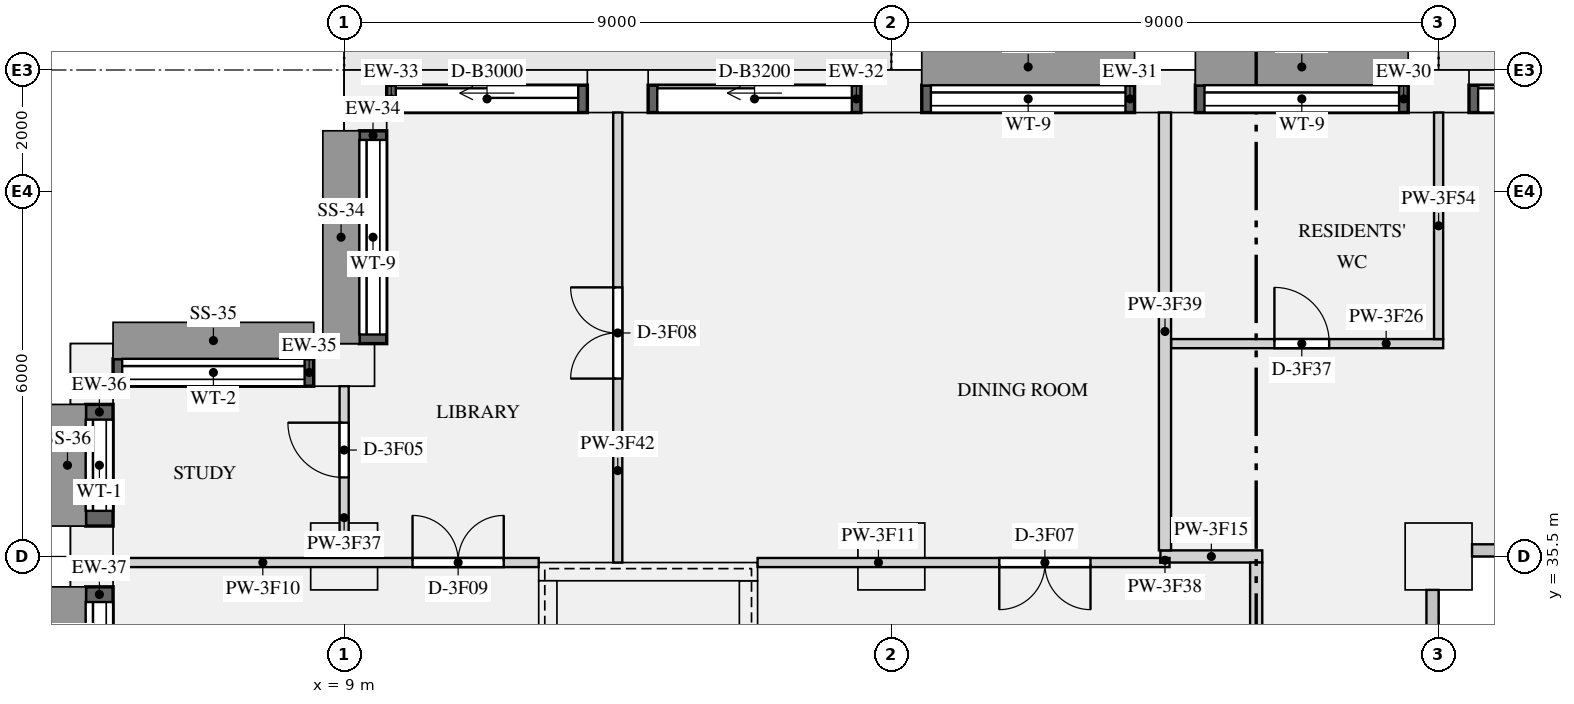
"""IFC4 building model, lengths in metres.
Left out: names, types, materials, properties, quantities, classifications, styles, units other than length and angle.
Written with IfcOpenShell. Run it as: python <this file> out.ifc"""

import sys

from ifc_helpers import new_model, si_unit, direction, frame, frame_2d, origin, origin_2d, place, context, subcontext, project, spatial, rectangle, extrude, element, fill, save


model = new_model("IFC4")
c1 = context("Model", 3, precision=1e-05, world=origin(), true_north=direction((0.0, 1.0)))
c2 = subcontext(c1, "Body", "Model", "MODEL_VIEW")
j1 = project(units=[si_unit("LENGTHUNIT", "METRE"), si_unit("PLANEANGLEUNIT", "RADIAN")], contexts=[c1])
p1 = place(None, origin())
s1 = spatial("IfcSite", under=j1, at=p1, CompositionType="ELEMENT")
p2 = place(p1, origin())
s2 = spatial("IfcBuilding", under=s1, at=p2, CompositionType="ELEMENT")
p3 = place(p2, frame((0.0, 0.0, 179.1)))
s3 = spatial("IfcBuildingStorey", under=s2, at=p3, CompositionType="ELEMENT", Elevation=179.1)
for number, where, z_axis, x_axis in (
    (1, (27.0, 43.15, 0.0), (0.0, 0.0, 1.0), (-1.0, 0.0, 0.0)),
    (2, (22.5, 43.15, 0.0), (0.0, 0.0, 1.0), (-1.0, 0.0, 0.0)),
    (3, (18.0, 43.15, 0.0), (0.0, 0.0, 1.0), (-1.0, 0.0, 0.0)),
    (4, (13.5, 43.15, 0.0), (0.0, 0.0, 1.0), (-1.0, 0.0, 0.0)),
    (5, (9.35, 43.0, 0.0), (0.0, 0.0, 1.0), (0.0, -1.0, 0.0)),
    (6, (9.0, 38.65, 0.0), (0.0, 0.0, 1.0), (-1.0, 0.0, 0.0)),
    (7, (4.85, 38.5, 0.0), (0.0, 0.0, 1.0), (0.0, -1.0, 0.0)),
    (8, (4.85, 35.5, 0.0), (0.0, 0.0, 1.0), (0.0, -1.0, 0.0)),
):
    element("IfcColumn", number, at=place(p3, frame(where, z_axis=z_axis, x_axis=x_axis)), inside=s3, PredefinedType="USERDEFINED", context=c2, shape_type="SweptSolid", body=[
        extrude(rectangle(XDim=1.0, YDim=0.7, at=origin_2d()), origin(), (0.0, 0.0, 1.0), 3.15),
    ])
for number, where, z_axis, x_axis in (
    (9, (9.0, 35.5, 0.0), (0.0, 0.0, 1.0), (1.0, 0.0, 0.0)),
    (10, (18.0, 35.5, 0.0), (0.0, 0.0, 1.0), (1.0, 0.0, 0.0)),
    (11, (27.0, 35.5, 0.0), (0.0, 0.0, 1.0), (1.0, 0.0, 0.0)),
):
    element("IfcColumn", number, at=place(p3, frame(where, z_axis=z_axis, x_axis=x_axis)), inside=s3, PredefinedType="COLUMN", context=c2, shape_type="SweptSolid", body=[
        extrude(rectangle(XDim=1.1, YDim=1.1, at=origin_2d()), origin(), (0.0, 0.0, 1.0), 3.15),
    ])
p4 = place(p3, frame((12.2, 35.25, 0.0), z_axis=(0.0, 0.0, 1.0), x_axis=(1.0, 0.0, 0.0)))
e12 = element("IfcWall", 12, at=p4, inside=s3, PredefinedType="SHEAR", context=c2, shape_type="SweptSolid", body=[
    extrude(rectangle(XDim=3.6, YDim=0.3, at=frame_2d((1.8, 0.0))), origin(), (0.0, 0.0, 1.0), 3.15),
])
for number, where, z_axis, x_axis in (
    (13, (12.35, 27.3, 0.0), (0.0, 0.0, 1.0), (0.0, 1.0, 0.0)),
    (14, (15.65, 27.3, 0.0), (0.0, 0.0, 1.0), (0.0, 1.0, 0.0)),
):
    element("IfcWall", number, at=place(p3, frame(where, z_axis=z_axis, x_axis=x_axis)), inside=s3, PredefinedType="SHEAR", context=c2, shape_type="SweptSolid", body=[
        extrude(rectangle(XDim=7.8, YDim=0.3, at=frame_2d((3.9, 0.0))), origin(), (0.0, 0.0, 1.0), 3.15),
    ])
p5 = place(p3, frame((31.0, 43.025, 0.0), z_axis=(0.0, 0.0, 1.0), x_axis=(-1.0, 0.0, 0.0)))
e15 = element("IfcWall", 15, at=p5, inside=s3, PredefinedType="SOLIDWALL", context=c2, shape_type="SweptSolid", body=[
    extrude(rectangle(XDim=3.5, YDim=0.45, at=frame_2d((1.75, 0.0))), origin(), (0.0, 0.0, 1.0), 2.83),
])
p6 = place(p5, frame((0.15, 0.0, 0.0)))
e16 = element("IfcOpeningElement", 16, at=p6, cuts=e15, PredefinedType="OPENING", context=c2, shape_type="SweptSolid", body=[
    extrude(rectangle(XDim=3.2, YDim=2.3, at=frame_2d((1.6, 1.15))), frame((0.0, 0.235, 0.0), z_axis=(0.0, -1.0, 0.0), x_axis=(1.0, 0.0, 0.0)), (0.0, 0.0, 1.0), 0.47),
])
p7 = place(p3, frame((26.5, 43.025, 0.9), z_axis=(0.0, 0.0, 1.0), x_axis=(-1.0, 0.0, 0.0)))
e17 = element("IfcWall", 17, at=p7, inside=s3, PredefinedType="SOLIDWALL", context=c2, shape_type="SweptSolid", body=[
    extrude(rectangle(XDim=3.5, YDim=0.45, at=frame_2d((1.75, 0.0))), origin(), (0.0, 0.0, 1.0), 1.93),
])
p8 = place(p7, frame((0.15, 0.0, 0.15)))
e18 = element("IfcOpeningElement", 18, at=p8, cuts=e17, PredefinedType="OPENING", context=c2, shape_type="SweptSolid", body=[
    extrude(rectangle(XDim=3.2, YDim=1.5, at=frame_2d((1.6, 0.75))), frame((0.0, 0.235, 0.0), z_axis=(0.0, -1.0, 0.0), x_axis=(1.0, 0.0, 0.0)), (0.0, 0.0, 1.0), 0.47),
])
p9 = place(p3, frame((22.0, 43.025, 0.9), z_axis=(0.0, 0.0, 1.0), x_axis=(-1.0, 0.0, 0.0)))
e19 = element("IfcWall", 19, at=p9, inside=s3, PredefinedType="SOLIDWALL", context=c2, shape_type="SweptSolid", body=[
    extrude(rectangle(XDim=3.5, YDim=0.45, at=frame_2d((1.75, 0.0))), origin(), (0.0, 0.0, 1.0), 1.93),
])
p10 = place(p9, frame((0.15, 0.0, 0.15)))
e20 = element("IfcOpeningElement", 20, at=p10, cuts=e19, PredefinedType="OPENING", context=c2, shape_type="SweptSolid", body=[
    extrude(rectangle(XDim=3.2, YDim=1.5, at=frame_2d((1.6, 0.75))), frame((0.0, 0.235, 0.0), z_axis=(0.0, -1.0, 0.0), x_axis=(1.0, 0.0, 0.0)), (0.0, 0.0, 1.0), 0.47),
])
p11 = place(p3, frame((17.5, 43.025, 0.0), z_axis=(0.0, 0.0, 1.0), x_axis=(-1.0, 0.0, 0.0)))
e21 = element("IfcWall", 21, at=p11, inside=s3, PredefinedType="SOLIDWALL", context=c2, shape_type="SweptSolid", body=[
    extrude(rectangle(XDim=3.5, YDim=0.45, at=frame_2d((1.75, 0.0))), origin(), (0.0, 0.0, 1.0), 2.83),
])
p12 = place(p11, frame((0.15, 0.0, 0.0)))
e22 = element("IfcOpeningElement", 22, at=p12, cuts=e21, PredefinedType="OPENING", context=c2, shape_type="SweptSolid", body=[
    extrude(rectangle(XDim=3.2, YDim=2.3, at=frame_2d((1.6, 1.15))), frame((0.0, 0.235, 0.0), z_axis=(0.0, -1.0, 0.0), x_axis=(1.0, 0.0, 0.0)), (0.0, 0.0, 1.0), 0.47),
])
p13 = place(p3, frame((13.0, 43.025, 0.0), z_axis=(0.0, 0.0, 1.0), x_axis=(-1.0, 0.0, 0.0)))
e23 = element("IfcWall", 23, at=p13, inside=s3, PredefinedType="SOLIDWALL", context=c2, shape_type="SweptSolid", body=[
    extrude(rectangle(XDim=3.3, YDim=0.45, at=frame_2d((1.65, 0.0))), origin(), (0.0, 0.0, 1.0), 2.83),
])
p14 = place(p13, frame((0.15, 0.0, 0.0)))
e24 = element("IfcOpeningElement", 24, at=p14, cuts=e23, PredefinedType="OPENING", context=c2, shape_type="SweptSolid", body=[
    extrude(rectangle(XDim=3.0, YDim=2.3, at=frame_2d((1.5, 1.15))), frame((0.0, 0.235, 0.0), z_axis=(0.0, -1.0, 0.0), x_axis=(1.0, 0.0, 0.0)), (0.0, 0.0, 1.0), 0.47),
])
p15 = place(p3, frame((9.475, 42.5, 0.9), z_axis=(0.0, 0.0, 1.0), x_axis=(0.0, -1.0, 0.0)))
e25 = element("IfcWall", 25, at=p15, inside=s3, PredefinedType="SOLIDWALL", context=c2, shape_type="SweptSolid", body=[
    extrude(rectangle(XDim=3.5, YDim=0.45, at=frame_2d((1.75, 0.0))), origin(), (0.0, 0.0, 1.0), 1.93),
])
p16 = place(p15, frame((0.15, 0.0, 0.15)))
e26 = element("IfcOpeningElement", 26, at=p16, cuts=e25, PredefinedType="OPENING", context=c2, shape_type="SweptSolid", body=[
    extrude(rectangle(XDim=3.2, YDim=1.5, at=frame_2d((1.6, 0.75))), frame((0.0, 0.235, 0.0), z_axis=(0.0, -1.0, 0.0), x_axis=(1.0, 0.0, 0.0)), (0.0, 0.0, 1.0), 0.47),
])
p17 = place(p3, frame((8.5, 38.525, 0.9), z_axis=(0.0, 0.0, 1.0), x_axis=(-1.0, 0.0, 0.0)))
e27 = element("IfcWall", 27, at=p17, inside=s3, PredefinedType="SOLIDWALL", context=c2, shape_type="SweptSolid", body=[
    extrude(rectangle(XDim=3.3, YDim=0.45, at=frame_2d((1.65, 0.0))), origin(), (0.0, 0.0, 1.0), 1.93),
])
p18 = place(p17, frame((0.15, 0.0, 0.15)))
e28 = element("IfcOpeningElement", 28, at=p18, cuts=e27, PredefinedType="OPENING", context=c2, shape_type="SweptSolid", body=[
    extrude(rectangle(XDim=3.0, YDim=1.5, at=frame_2d((1.5, 0.75))), frame((0.0, 0.235, 0.0), z_axis=(0.0, -1.0, 0.0), x_axis=(1.0, 0.0, 0.0)), (0.0, 0.0, 1.0), 0.47),
])
p19 = place(p3, frame((4.975, 38.0, 0.9), z_axis=(0.0, 0.0, 1.0), x_axis=(0.0, -1.0, 0.0)))
e29 = element("IfcWall", 29, at=p19, inside=s3, PredefinedType="SOLIDWALL", context=c2, shape_type="SweptSolid", body=[
    extrude(rectangle(XDim=2.0, YDim=0.45, at=frame_2d((1.0, 0.0))), origin(), (0.0, 0.0, 1.0), 1.93),
])
p20 = place(p19, frame((0.25, 0.0, 0.15)))
e30 = element("IfcOpeningElement", 30, at=p20, cuts=e29, PredefinedType="OPENING", context=c2, shape_type="SweptSolid", body=[
    extrude(rectangle(XDim=1.5, YDim=1.5, at=frame_2d((0.75, 0.75))), frame((0.0, 0.235, 0.0), z_axis=(0.0, -1.0, 0.0), x_axis=(1.0, 0.0, 0.0)), (0.0, 0.0, 1.0), 0.47),
])
p21 = place(p3, frame((4.975, 35.0, 0.9), z_axis=(0.0, 0.0, 1.0), x_axis=(0.0, -1.0, 0.0)))
e31 = element("IfcWall", 31, at=p21, inside=s3, PredefinedType="SOLIDWALL", context=c2, shape_type="SweptSolid", body=[
    extrude(rectangle(XDim=2.5, YDim=0.45, at=frame_2d((1.25, 0.0))), origin(), (0.0, 0.0, 1.0), 1.93),
])
p22 = place(p21, frame((0.25, 0.0, 0.15)))
e32 = element("IfcOpeningElement", 32, at=p22, cuts=e31, PredefinedType="OPENING", context=c2, shape_type="SweptSolid", body=[
    extrude(rectangle(XDim=2.0, YDim=1.5, at=frame_2d((1.0, 0.75))), frame((0.0, 0.235, 0.0), z_axis=(0.0, -1.0, 0.0), x_axis=(1.0, 0.0, 0.0)), (0.0, 0.0, 1.0), 0.47),
])
p23 = place(p3, frame((5.2, 35.4, 0.0), z_axis=(0.0, 0.0, 1.0), x_axis=(1.0, 0.0, 0.0)))
e33 = element("IfcWall", 33, at=p23, inside=s3, PredefinedType="PARTITIONING", context=c2, shape_type="SweptSolid", body=[
    extrude(rectangle(XDim=7.0, YDim=0.15, at=frame_2d((3.5, 0.0))), origin(), (0.0, 0.0, 1.0), 2.83),
])
p24 = place(p23, frame((4.925, 0.0, 0.0)))
e34 = element("IfcOpeningElement", 34, at=p24, cuts=e33, PredefinedType="OPENING", context=c2, shape_type="SweptSolid", body=[
    extrude(rectangle(XDim=1.5, YDim=2.1, at=frame_2d((0.75, 1.05))), frame((0.0, 0.085, 0.0), z_axis=(0.0, -1.0, 0.0), x_axis=(1.0, 0.0, 0.0)), (0.0, 0.0, 1.0), 0.17),
])
p25 = place(p3, frame((15.8, 35.4, 0.0), z_axis=(0.0, 0.0, 1.0), x_axis=(1.0, 0.0, 0.0)))
e35 = element("IfcWall", 35, at=p25, inside=s3, PredefinedType="PARTITIONING", context=c2, shape_type="SweptSolid", body=[
    extrude(rectangle(XDim=6.775, YDim=0.15, at=frame_2d((3.387, 0.0))), origin(), (0.0, 0.0, 1.0), 2.83),
])
p26 = place(p25, frame((3.975, 0.0, 0.0)))
e36 = element("IfcOpeningElement", 36, at=p26, cuts=e35, PredefinedType="OPENING", context=c2, shape_type="SweptSolid", body=[
    extrude(rectangle(XDim=1.5, YDim=2.1, at=frame_2d((0.75, 1.05))), frame((0.0, 0.085, 0.0), z_axis=(0.0, -1.0, 0.0), x_axis=(1.0, 0.0, 0.0)), (0.0, 0.0, 1.0), 0.17),
])
p27 = place(p3, frame((22.425, 35.5, 0.0), z_axis=(0.0, 0.0, 1.0), x_axis=(1.0, 0.0, 0.0)))
e37 = element("IfcWall", 37, at=p27, inside=s3, PredefinedType="PARTITIONING", context=c2, shape_type="SweptSolid", body=[
    extrude(rectangle(XDim=1.675, YDim=0.2, at=frame_2d((0.837, 0.0))), origin(), (0.0, 0.0, 1.0), 2.83),
])
p28 = place(p3, frame((22.6, 39.0, 0.0), z_axis=(0.0, 0.0, 1.0), x_axis=(1.0, 0.0, 0.0)))
e38 = element("IfcWall", 38, at=p28, inside=s3, PredefinedType="PARTITIONING", context=c2, shape_type="SweptSolid", body=[
    extrude(rectangle(XDim=4.475, YDim=0.15, at=frame_2d((2.237, 0.0))), origin(), (0.0, 0.0, 1.0), 2.83),
])
p29 = place(p28, frame((1.7, 0.0, 0.0)))
e39 = element("IfcOpeningElement", 39, at=p29, cuts=e38, PredefinedType="OPENING", context=c2, shape_type="SweptSolid", body=[
    extrude(rectangle(XDim=0.9, YDim=2.1, at=frame_2d((0.45, 1.05))), frame((0.0, 0.085, 0.0), z_axis=(0.0, -1.0, 0.0), x_axis=(1.0, 0.0, 0.0)), (0.0, 0.0, 1.0), 0.17),
])
p30 = place(p3, frame((24.0, 27.1, 0.0), z_axis=(0.0, 0.0, 1.0), x_axis=(0.0, 1.0, 0.0)))
e40 = element("IfcWall", 40, at=p30, inside=s3, PredefinedType="PARTITIONING", context=c2, shape_type="SweptSolid", body=[
    extrude(rectangle(XDim=8.3, YDim=0.2, at=frame_2d((4.15, 0.0))), origin(), (0.0, 0.0, 1.0), 2.83),
])
p31 = place(p3, frame((9.0, 35.475, 0.0), z_axis=(0.0, 0.0, 1.0), x_axis=(0.0, 1.0, 0.0)))
e41 = element("IfcWall", 41, at=p31, inside=s3, PredefinedType="PARTITIONING", context=c2, shape_type="SweptSolid", body=[
    extrude(rectangle(XDim=2.825, YDim=0.15, at=frame_2d((1.413, 0.0))), origin(), (0.0, 0.0, 1.0), 2.83),
])
p32 = place(p31, frame((1.325, 0.0, 0.0)))
e42 = element("IfcOpeningElement", 42, at=p32, cuts=e41, PredefinedType="OPENING", context=c2, shape_type="SweptSolid", body=[
    extrude(rectangle(XDim=0.9, YDim=2.1, at=frame_2d((0.45, 1.05))), frame((0.0, 0.085, 0.0), z_axis=(0.0, -1.0, 0.0), x_axis=(1.0, 0.0, 0.0)), (0.0, 0.0, 1.0), 0.17),
])
p33 = place(p3, frame((22.5, 35.4, 0.0), z_axis=(0.0, 0.0, 1.0), x_axis=(0.0, 1.0, 0.0)))
e43 = element("IfcWall", 43, at=p33, inside=s3, PredefinedType="PARTITIONING", context=c2, shape_type="SweptSolid", body=[
    extrude(rectangle(XDim=0.075, YDim=0.15, at=frame_2d((0.038, 0.0))), origin(), (0.0, 0.0, 1.0), 2.83),
])
p34 = place(p3, frame((22.5, 35.6, 0.0), z_axis=(0.0, 0.0, 1.0), x_axis=(0.0, 1.0, 0.0)))
e44 = element("IfcWall", 44, at=p34, inside=s3, PredefinedType="PARTITIONING", context=c2, shape_type="SweptSolid", body=[
    extrude(rectangle(XDim=7.2, YDim=0.2, at=frame_2d((3.6, 0.0))), origin(), (0.0, 0.0, 1.0), 2.83),
])
p35 = place(p3, frame((13.5, 35.4, 0.0), z_axis=(0.0, 0.0, 1.0), x_axis=(0.0, 1.0, 0.0)))
e45 = element("IfcWall", 45, at=p35, inside=s3, PredefinedType="PARTITIONING", context=c2, shape_type="SweptSolid", body=[
    extrude(rectangle(XDim=7.4, YDim=0.15, at=frame_2d((3.7, 0.0))), origin(), (0.0, 0.0, 1.0), 2.83),
])
p36 = place(p35, frame((3.025, 0.0, 0.0)))
e46 = element("IfcOpeningElement", 46, at=p36, cuts=e45, PredefinedType="OPENING", context=c2, shape_type="SweptSolid", body=[
    extrude(rectangle(XDim=1.5, YDim=2.1, at=frame_2d((0.75, 1.05))), frame((0.0, 0.085, 0.0), z_axis=(0.0, -1.0, 0.0), x_axis=(1.0, 0.0, 0.0)), (0.0, 0.0, 1.0), 0.17),
])
p37 = place(p3, frame((27.0, 39.075, 0.0), z_axis=(0.0, 0.0, 1.0), x_axis=(0.0, 1.0, 0.0)))
e47 = element("IfcWall", 47, at=p37, inside=s3, PredefinedType="PARTITIONING", context=c2, shape_type="SweptSolid", body=[
    extrude(rectangle(XDim=3.725, YDim=0.15, at=frame_2d((1.863, 0.0))), origin(), (0.0, 0.0, 1.0), 2.83),
])
p38 = place(p6, origin())
e48 = element("IfcDoor", 48, at=p38, inside=s3, OperationType="SLIDING_TO_LEFT", PredefinedType="DOOR", context=c2, shape_type="SweptSolid", body=[
    extrude(rectangle(XDim=3.2, YDim=2.3, at=frame_2d((1.6, 1.15))), frame((0.0, -0.07, 0.0), z_axis=(0.0, -1.0, 0.0), x_axis=(1.0, 0.0, 0.0)), (0.0, 0.0, 1.0), 0.05),
])
fill(e16, e48)
p39 = place(p8, origin())
e49 = element("IfcWindow", 49, at=p39, inside=s3, PartitioningType="SINGLE_PANEL", PredefinedType="WINDOW", context=c2, shape_type="SweptSolid", body=[
    extrude(rectangle(XDim=3.2, YDim=1.5, at=frame_2d((1.6, 0.75))), frame((0.0, -0.065, 0.0), z_axis=(0.0, -1.0, 0.0), x_axis=(1.0, 0.0, 0.0)), (0.0, 0.0, 1.0), 0.06),
])
fill(e18, e49)
p40 = place(p10, origin())
e50 = element("IfcWindow", 50, at=p40, inside=s3, PartitioningType="SINGLE_PANEL", PredefinedType="WINDOW", context=c2, shape_type="SweptSolid", body=[
    extrude(rectangle(XDim=3.2, YDim=1.5, at=frame_2d((1.6, 0.75))), frame((0.0, -0.065, 0.0), z_axis=(0.0, -1.0, 0.0), x_axis=(1.0, 0.0, 0.0)), (0.0, 0.0, 1.0), 0.06),
])
fill(e20, e50)
p41 = place(p12, origin())
e51 = element("IfcDoor", 51, at=p41, inside=s3, OperationType="SLIDING_TO_LEFT", PredefinedType="DOOR", context=c2, shape_type="SweptSolid", body=[
    extrude(rectangle(XDim=3.2, YDim=2.3, at=frame_2d((1.6, 1.15))), frame((0.0, -0.07, 0.0), z_axis=(0.0, -1.0, 0.0), x_axis=(1.0, 0.0, 0.0)), (0.0, 0.0, 1.0), 0.05),
])
fill(e22, e51)
p42 = place(p14, origin())
e52 = element("IfcDoor", 52, at=p42, inside=s3, OperationType="SLIDING_TO_LEFT", PredefinedType="DOOR", context=c2, shape_type="SweptSolid", body=[
    extrude(rectangle(XDim=3.0, YDim=2.3, at=frame_2d((1.5, 1.15))), frame((0.0, -0.07, 0.0), z_axis=(0.0, -1.0, 0.0), x_axis=(1.0, 0.0, 0.0)), (0.0, 0.0, 1.0), 0.05),
])
fill(e24, e52)
p43 = place(p16, origin())
e53 = element("IfcWindow", 53, at=p43, inside=s3, PartitioningType="SINGLE_PANEL", PredefinedType="WINDOW", context=c2, shape_type="SweptSolid", body=[
    extrude(rectangle(XDim=3.2, YDim=1.5, at=frame_2d((1.6, 0.75))), frame((0.0, -0.065, 0.0), z_axis=(0.0, -1.0, 0.0), x_axis=(1.0, 0.0, 0.0)), (0.0, 0.0, 1.0), 0.06),
])
fill(e26, e53)
p44 = place(p18, origin())
e54 = element("IfcWindow", 54, at=p44, inside=s3, PartitioningType="SINGLE_PANEL", PredefinedType="WINDOW", context=c2, shape_type="SweptSolid", body=[
    extrude(rectangle(XDim=3.0, YDim=1.5, at=frame_2d((1.5, 0.75))), frame((0.0, -0.065, 0.0), z_axis=(0.0, -1.0, 0.0), x_axis=(1.0, 0.0, 0.0)), (0.0, 0.0, 1.0), 0.06),
])
fill(e28, e54)
p45 = place(p20, origin())
e55 = element("IfcWindow", 55, at=p45, inside=s3, PartitioningType="SINGLE_PANEL", PredefinedType="WINDOW", context=c2, shape_type="SweptSolid", body=[
    extrude(rectangle(XDim=1.5, YDim=1.5, at=frame_2d((0.75, 0.75))), frame((0.0, -0.065, 0.0), z_axis=(0.0, -1.0, 0.0), x_axis=(1.0, 0.0, 0.0)), (0.0, 0.0, 1.0), 0.06),
])
fill(e30, e55)
p46 = place(p22, origin())
e56 = element("IfcWindow", 56, at=p46, inside=s3, PartitioningType="SINGLE_PANEL", PredefinedType="WINDOW", context=c2, shape_type="SweptSolid", body=[
    extrude(rectangle(XDim=2.0, YDim=1.5, at=frame_2d((1.0, 0.75))), frame((0.0, -0.065, 0.0), z_axis=(0.0, -1.0, 0.0), x_axis=(1.0, 0.0, 0.0)), (0.0, 0.0, 1.0), 0.06),
])
fill(e32, e56)
p47 = place(p32, origin())
e57 = element("IfcDoor", 57, at=p47, inside=s3, OperationType="SINGLE_SWING_RIGHT", PredefinedType="DOOR", context=c2, shape_type="SweptSolid", body=[
    extrude(rectangle(XDim=0.9, YDim=2.1, at=frame_2d((0.45, 1.05))), frame((0.0, 0.025, 0.0), z_axis=(0.0, -1.0, 0.0), x_axis=(1.0, 0.0, 0.0)), (0.0, 0.0, 1.0), 0.05),
])
fill(e42, e57)
p48 = place(p26, frame((1.5, 0.0, 0.0), z_axis=(0.0, 0.0, 1.0), x_axis=(-1.0, 0.0, 0.0)))
e58 = element("IfcDoor", 58, at=p48, inside=s3, OperationType="DOUBLE_DOOR_SINGLE_SWING", PredefinedType="DOOR", context=c2, shape_type="SweptSolid", body=[
    extrude(rectangle(XDim=1.5, YDim=2.1, at=frame_2d((0.75, 1.05))), frame((0.0, 0.025, 0.0), z_axis=(0.0, -1.0, 0.0), x_axis=(1.0, 0.0, 0.0)), (0.0, 0.0, 1.0), 0.05),
])
fill(e36, e58)
p49 = place(p36, origin())
e59 = element("IfcDoor", 59, at=p49, inside=s3, OperationType="DOUBLE_DOOR_SINGLE_SWING", PredefinedType="DOOR", context=c2, shape_type="SweptSolid", body=[
    extrude(rectangle(XDim=1.5, YDim=2.1, at=frame_2d((0.75, 1.05))), frame((0.0, 0.025, 0.0), z_axis=(0.0, -1.0, 0.0), x_axis=(1.0, 0.0, 0.0)), (0.0, 0.0, 1.0), 0.05),
])
fill(e46, e59)
p50 = place(p24, origin())
e60 = element("IfcDoor", 60, at=p50, inside=s3, OperationType="DOUBLE_DOOR_SINGLE_SWING", PredefinedType="DOOR", context=c2, shape_type="SweptSolid", body=[
    extrude(rectangle(XDim=1.5, YDim=2.1, at=frame_2d((0.75, 1.05))), frame((0.0, 0.025, 0.0), z_axis=(0.0, -1.0, 0.0), x_axis=(1.0, 0.0, 0.0)), (0.0, 0.0, 1.0), 0.05),
])
fill(e34, e60)
p51 = place(p29, origin())
e61 = element("IfcDoor", 61, at=p51, inside=s3, OperationType="SINGLE_SWING_LEFT", PredefinedType="DOOR", context=c2, shape_type="SweptSolid", body=[
    extrude(rectangle(XDim=0.9, YDim=2.1, at=frame_2d((0.45, 1.05))), frame((0.0, 0.025, 0.0), z_axis=(0.0, -1.0, 0.0), x_axis=(1.0, 0.0, 0.0)), (0.0, 0.0, 1.0), 0.05),
])
fill(e39, e61)
save(model, sys.argv[1])
